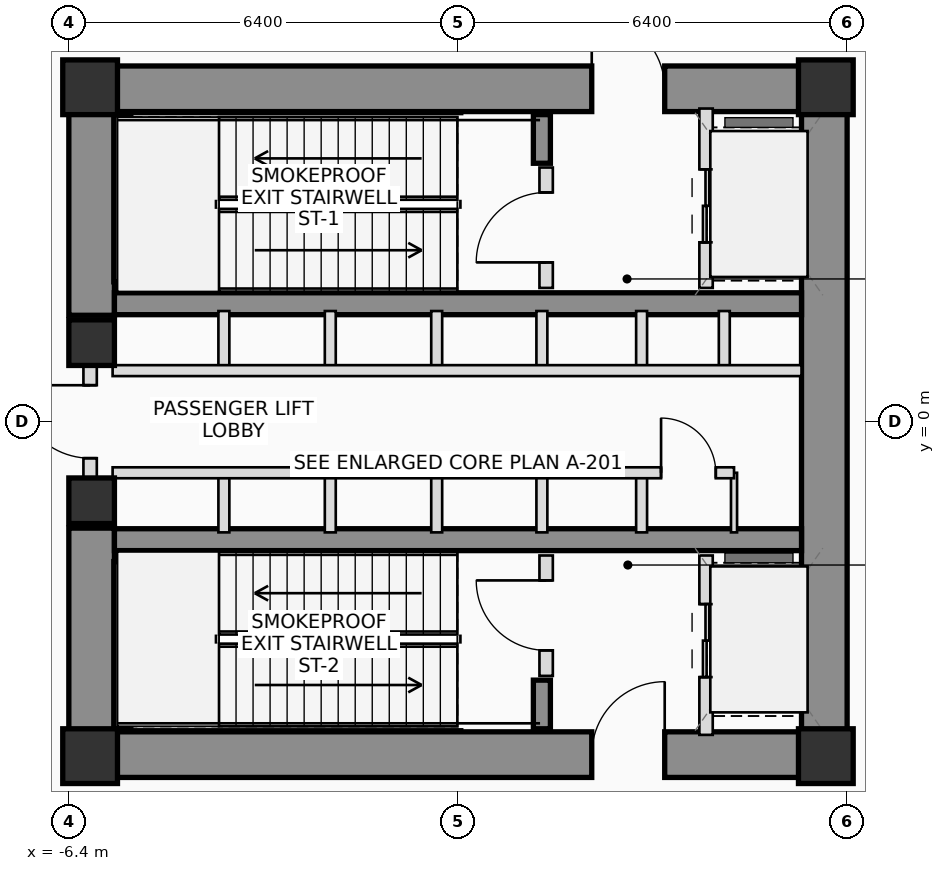
"""IFC4 building model, lengths in metres.
Left out: names, types, materials, properties, quantities, classifications, styles, units other than length and angle.
Written with IfcOpenShell. Run it as: python <this file> out.ifc"""

import sys

from ifc_helpers import new_model, si_unit, direction, frame, frame_2d, origin, origin_2d, place, context, subcontext, project, spatial, rectangle, extrude, source, transform, mapped, element, fill, save


model = new_model("IFC4")
c1 = context("Model", 3, precision=1e-05, world=origin(), true_north=direction((0.0, 1.0)))
c2 = subcontext(c1, "Body", "Model", "MODEL_VIEW")
j1 = project(units=[si_unit("LENGTHUNIT", "METRE"), si_unit("PLANEANGLEUNIT", "RADIAN")], contexts=[c1])
p1 = place(None, origin())
s1 = spatial("IfcSite", under=j1, at=p1, CompositionType="ELEMENT")
p2 = place(p1, origin())
s2 = spatial("IfcBuilding", under=s1, at=p2, CompositionType="ELEMENT")
p3 = place(p2, frame((0.0, 0.0, -4.8)))
s3 = spatial("IfcBuildingStorey", under=s2, at=p3, CompositionType="ELEMENT", Elevation=-4.8)
m1 = source(origin(), c2, "Body", "SweptSolid", [
    extrude(rectangle(XDim=0.9, YDim=0.9, at=origin_2d()), origin(), (0.0, 0.0, 1.0), 4.8),
])
for number, where, z_axis, x_axis in (
    (1, (-6.05, -5.5, 0.0), (0.0, 0.0, 1.0), (1.0, 0.0, 0.0)),
    (2, (6.05, -5.5, 0.0), (0.0, 0.0, 1.0), (1.0, 0.0, 0.0)),
    (3, (6.05, 5.5, 0.0), (0.0, 0.0, 1.0), (1.0, 0.0, 0.0)),
    (4, (-6.05, 5.5, 0.0), (0.0, 0.0, 1.0), (1.0, 0.0, 0.0)),
):
    element("IfcColumn", number, at=place(p3, frame(where, z_axis=z_axis, x_axis=x_axis)), inside=s3, PredefinedType="COLUMN", context=c2, shape_type="MappedRepresentation", body=[
        mapped(m1, transform((0.0, 0.0, 0.0), scale=1.0)),
    ])
p4 = place(p3, frame((-6.4, 5.475, 0.0), z_axis=(0.0, 0.0, 1.0), x_axis=(1.0, 0.0, 0.0)))
e5 = element("IfcWall", 5, at=p4, inside=s3, PredefinedType="SHEAR", context=c2, shape_type="SweptSolid", body=[
    extrude(rectangle(XDim=12.8, YDim=0.75, at=frame_2d((6.4, 0.0))), origin(), (0.0, 0.0, 1.0), 4.8),
])
p5 = place(p4, frame((8.6, 0.0, 0.0)))
e6 = element("IfcOpeningElement", 6, at=p5, cuts=e5, PredefinedType="OPENING", context=c2, shape_type="SweptSolid", body=[
    extrude(rectangle(XDim=1.2, YDim=2.2, at=frame_2d((0.6, 1.1))), frame((0.0, 0.385, 0.0), z_axis=(0.0, -1.0, 0.0), x_axis=(1.0, 0.0, 0.0)), (0.0, 0.0, 1.0), 0.77),
])
p6 = place(p3, frame((-6.4, -5.475, 0.0), z_axis=(0.0, 0.0, 1.0), x_axis=(1.0, 0.0, 0.0)))
e7 = element("IfcWall", 7, at=p6, inside=s3, PredefinedType="SHEAR", context=c2, shape_type="SweptSolid", body=[
    extrude(rectangle(XDim=12.8, YDim=0.75, at=frame_2d((6.4, 0.0))), origin(), (0.0, 0.0, 1.0), 4.8),
])
p7 = place(p6, frame((8.6, 0.0, 0.0)))
e8 = element("IfcOpeningElement", 8, at=p7, cuts=e7, PredefinedType="OPENING", context=c2, shape_type="SweptSolid", body=[
    extrude(rectangle(XDim=1.2, YDim=2.2, at=frame_2d((0.6, 1.1))), frame((0.0, 0.385, 0.0), z_axis=(0.0, -1.0, 0.0), x_axis=(1.0, 0.0, 0.0)), (0.0, 0.0, 1.0), 0.77),
])
p8 = place(p3, frame((6.025, -5.1, 0.0), z_axis=(0.0, 0.0, 1.0), x_axis=(0.0, 1.0, 0.0)))
e9 = element("IfcWall", 9, at=p8, inside=s3, PredefinedType="SHEAR", context=c2, shape_type="SweptSolid", body=[
    extrude(rectangle(XDim=10.2, YDim=0.75, at=frame_2d((5.1, 0.0))), origin(), (0.0, 0.0, 1.0), 4.8),
])
for number, where, z_axis, x_axis in (
    (10, (-6.025, -5.1, 0.0), (0.0, 0.0, 1.0), (0.0, 1.0, 0.0)),
    (11, (-6.025, 1.75, 0.0), (0.0, 0.0, 1.0), (0.0, 1.0, 0.0)),
):
    element("IfcWall", number, at=place(p3, frame(where, z_axis=z_axis, x_axis=x_axis)), inside=s3, PredefinedType="SHEAR", context=c2, shape_type="SweptSolid", body=[
        extrude(rectangle(XDim=3.35, YDim=0.75, at=frame_2d((1.675, 0.0))), origin(), (0.0, 0.0, 1.0), 4.8),
    ])
for number, where, z_axis, x_axis in (
    (12, (-5.65, 1.94, 0.0), (0.0, 0.0, 1.0), (1.0, 0.0, 0.0)),
    (13, (-5.65, -1.94, 0.0), (0.0, 0.0, 1.0), (1.0, 0.0, 0.0)),
):
    element("IfcWall", number, at=place(p3, frame(where, z_axis=z_axis, x_axis=x_axis)), inside=s3, PredefinedType="SHEAR", context=c2, shape_type="SweptSolid", body=[
        extrude(rectangle(XDim=11.3, YDim=0.36, at=frame_2d((5.65, 0.0))), origin(), (0.0, 0.0, 1.0), 4.8),
    ])
p9 = place(p3, frame((-5.52, 2.3, 0.0), z_axis=(0.0, 0.0, 1.0), x_axis=(0.0, 1.0, 0.0)))
e14 = element("IfcWall", 14, at=p9, inside=s3, PredefinedType="SHEAR", context=c2, shape_type="SweptSolid", body=[
    extrude(rectangle(XDim=2.75, YDim=0.28, at=frame_2d((1.375, 0.0))), origin(), (0.0, 0.0, 1.0), 4.8),
])
p10 = place(p3, frame((1.38, 4.25, 0.0), z_axis=(0.0, 0.0, 1.0), x_axis=(0.0, 1.0, 0.0)))
e15 = element("IfcWall", 15, at=p10, inside=s3, PredefinedType="SHEAR", context=c2, shape_type="SweptSolid", body=[
    extrude(rectangle(XDim=0.8, YDim=0.28, at=frame_2d((0.4, 0.0))), origin(), (0.0, 0.0, 1.0), 4.8),
])
p11 = place(p3, frame((-5.52, -5.05, 0.0), z_axis=(0.0, 0.0, 1.0), x_axis=(0.0, 1.0, 0.0)))
e16 = element("IfcWall", 16, at=p11, inside=s3, PredefinedType="SHEAR", context=c2, shape_type="SweptSolid", body=[
    extrude(rectangle(XDim=2.75, YDim=0.28, at=frame_2d((1.375, 0.0))), origin(), (0.0, 0.0, 1.0), 4.8),
])
p12 = place(p3, frame((1.38, -5.05, 0.0), z_axis=(0.0, 0.0, 1.0), x_axis=(0.0, 1.0, 0.0)))
e17 = element("IfcWall", 17, at=p12, inside=s3, PredefinedType="SHEAR", context=c2, shape_type="SweptSolid", body=[
    extrude(rectangle(XDim=0.8, YDim=0.28, at=frame_2d((0.4, 0.0))), origin(), (0.0, 0.0, 1.0), 4.8),
])
m2 = source(origin(), c2, "Body", "SweptSolid", [
    extrude(rectangle(XDim=0.75, YDim=0.75, at=origin_2d()), origin(), (0.0, 0.0, 1.0), 4.8),
])
for number, where, z_axis, x_axis in (
    (18, (-6.025, -1.3, 0.0), (0.0, 0.0, 1.0), (1.0, 0.0, 0.0)),
    (19, (-6.025, 1.3, 0.0), (0.0, 0.0, 1.0), (1.0, 0.0, 0.0)),
):
    element("IfcColumn", number, at=place(p3, frame(where, z_axis=z_axis, x_axis=x_axis)), inside=s3, PredefinedType="COLUMN", context=c2, shape_type="MappedRepresentation", body=[
        mapped(m2, transform((0.0, 0.0, 0.0), scale=1.0)),
    ])
p13 = place(p3, frame((-6.05, -0.95, 0.0), z_axis=(0.0, 0.0, 1.0), x_axis=(0.0, 1.0, 0.0)))
e20 = element("IfcWall", 20, at=p13, inside=s3, PredefinedType="PLUMBINGWALL", context=c2, shape_type="SweptSolid", body=[
    extrude(rectangle(XDim=1.9, YDim=0.22, at=frame_2d((0.95, 0.0))), origin(), (0.0, 0.0, 1.0), 3.52),
])
p14 = place(p13, frame((0.35, 0.0, 0.0)))
e21 = element("IfcOpeningElement", 21, at=p14, cuts=e20, PredefinedType="OPENING", context=c2, shape_type="SweptSolid", body=[
    extrude(rectangle(XDim=1.2, YDim=2.2, at=frame_2d((0.6, 1.1))), frame((0.0, 0.12, 0.0), z_axis=(0.0, -1.0, 0.0), x_axis=(1.0, 0.0, 0.0)), (0.0, 0.0, 1.0), 0.24),
])
p15 = place(p3, frame((1.45, 2.2, 0.0), z_axis=(0.0, 0.0, 1.0), x_axis=(0.0, 1.0, 0.0)))
e22 = element("IfcWall", 22, at=p15, inside=s3, PredefinedType="PLUMBINGWALL", context=c2, shape_type="SweptSolid", body=[
    extrude(rectangle(XDim=1.98, YDim=0.22, at=frame_2d((0.99, 0.0))), origin(), (0.0, 0.0, 1.0), 4.54),
])
p16 = place(p15, frame((0.42, 0.0, 0.0)))
e23 = element("IfcOpeningElement", 23, at=p16, cuts=e22, PredefinedType="OPENING", context=c2, shape_type="SweptSolid", body=[
    extrude(rectangle(XDim=1.15, YDim=2.15, at=frame_2d((0.575, 1.075))), frame((0.0, 0.12, 0.0), z_axis=(0.0, -1.0, 0.0), x_axis=(1.0, 0.0, 0.0)), (0.0, 0.0, 1.0), 0.24),
])
p17 = place(p3, frame((4.08, 2.2, 0.0), z_axis=(0.0, 0.0, 1.0), x_axis=(0.0, 1.0, 0.0)))
e24 = element("IfcWall", 24, at=p17, inside=s3, PredefinedType="PLUMBINGWALL", context=c2, shape_type="SweptSolid", body=[
    extrude(rectangle(XDim=2.95, YDim=0.22, at=frame_2d((1.475, 0.0))), origin(), (0.0, 0.0, 1.0), 4.54),
])
p18 = place(p17, frame((0.75, 0.0, 0.0)))
e25 = element("IfcOpeningElement", 25, at=p18, cuts=e24, PredefinedType="OPENING", context=c2, shape_type="SweptSolid", body=[
    extrude(rectangle(XDim=1.2, YDim=2.25, at=frame_2d((0.6, 1.125))), frame((0.0, 0.12, 0.0), z_axis=(0.0, -1.0, 0.0), x_axis=(1.0, 0.0, 0.0)), (0.0, 0.0, 1.0), 0.24),
])
p19 = place(p3, frame((1.45, -4.18, 0.0), z_axis=(0.0, 0.0, 1.0), x_axis=(0.0, 1.0, 0.0)))
e26 = element("IfcWall", 26, at=p19, inside=s3, PredefinedType="PLUMBINGWALL", context=c2, shape_type="SweptSolid", body=[
    extrude(rectangle(XDim=1.98, YDim=0.22, at=frame_2d((0.99, 0.0))), origin(), (0.0, 0.0, 1.0), 4.54),
])
p20 = place(p19, frame((0.42, 0.0, 0.0)))
e27 = element("IfcOpeningElement", 27, at=p20, cuts=e26, PredefinedType="OPENING", context=c2, shape_type="SweptSolid", body=[
    extrude(rectangle(XDim=1.15, YDim=2.15, at=frame_2d((0.575, 1.075))), frame((0.0, 0.12, 0.0), z_axis=(0.0, -1.0, 0.0), x_axis=(1.0, 0.0, 0.0)), (0.0, 0.0, 1.0), 0.24),
])
p21 = place(p3, frame((4.08, -5.15, 0.0), z_axis=(0.0, 0.0, 1.0), x_axis=(0.0, 1.0, 0.0)))
e28 = element("IfcWall", 28, at=p21, inside=s3, PredefinedType="PLUMBINGWALL", context=c2, shape_type="SweptSolid", body=[
    extrude(rectangle(XDim=2.95, YDim=0.22, at=frame_2d((1.475, 0.0))), origin(), (0.0, 0.0, 1.0), 4.54),
])
p22 = place(p21, frame((0.95, 0.0, 0.0)))
e29 = element("IfcOpeningElement", 29, at=p22, cuts=e28, PredefinedType="OPENING", context=c2, shape_type="SweptSolid", body=[
    extrude(rectangle(XDim=1.2, YDim=2.25, at=frame_2d((0.6, 1.125))), frame((0.0, 0.12, 0.0), z_axis=(0.0, -1.0, 0.0), x_axis=(1.0, 0.0, 0.0)), (0.0, 0.0, 1.0), 0.24),
])
for number, where, z_axis, x_axis in (
    (30, (-3.85, 0.84, 0.0), (0.0, 0.0, 1.0), (0.0, 1.0, 0.0)),
    (31, (-3.85, -1.82, 0.0), (0.0, 0.0, 1.0), (0.0, 1.0, 0.0)),
    (32, (-2.1, 0.84, 0.0), (0.0, 0.0, 1.0), (0.0, 1.0, 0.0)),
    (33, (-2.1, -1.82, 0.0), (0.0, 0.0, 1.0), (0.0, 1.0, 0.0)),
    (34, (-0.35, 0.84, 0.0), (0.0, 0.0, 1.0), (0.0, 1.0, 0.0)),
    (35, (-0.35, -1.82, 0.0), (0.0, 0.0, 1.0), (0.0, 1.0, 0.0)),
    (36, (1.38, 0.84, 0.0), (0.0, 0.0, 1.0), (0.0, 1.0, 0.0)),
    (37, (1.38, -1.82, 0.0), (0.0, 0.0, 1.0), (0.0, 1.0, 0.0)),
    (38, (3.02, 0.84, 0.0), (0.0, 0.0, 1.0), (0.0, 1.0, 0.0)),
    (39, (4.38, 0.84, 0.0), (0.0, 0.0, 1.0), (0.0, 1.0, 0.0)),
    (40, (3.02, -1.82, 0.0), (0.0, 0.0, 1.0), (0.0, 1.0, 0.0)),
):
    element("IfcWall", number, at=place(p3, frame(where, z_axis=z_axis, x_axis=x_axis)), inside=s3, PredefinedType="PLUMBINGWALL", context=c2, shape_type="SweptSolid", body=[
        extrude(rectangle(XDim=0.98, YDim=0.18, at=frame_2d((0.49, 0.0))), origin(), (0.0, 0.0, 1.0), 4.54),
    ])
p23 = place(p3, frame((4.54, -1.82, 0.0), z_axis=(0.0, 0.0, 1.0), x_axis=(0.0, 1.0, 0.0)))
e41 = element("IfcWall", 41, at=p23, inside=s3, PredefinedType="PARTITIONING", context=c2, shape_type="SweptSolid", body=[
    extrude(rectangle(XDim=0.98, YDim=0.1, at=frame_2d((0.49, 0.0))), origin(), (0.0, 0.0, 1.0), 4.54),
])
p24 = place(p3, frame((-5.68, 0.84, 0.0), z_axis=(0.0, 0.0, 1.0), x_axis=(1.0, 0.0, 0.0)))
e42 = element("IfcWall", 42, at=p24, inside=s3, PredefinedType="PLUMBINGWALL", context=c2, shape_type="SweptSolid", body=[
    extrude(rectangle(XDim=11.33, YDim=0.18, at=frame_2d((5.665, 0.0))), origin(), (0.0, 0.0, 1.0), 4.54),
])
p25 = place(p3, frame((-5.68, -0.84, 0.0), z_axis=(0.0, 0.0, 1.0), x_axis=(1.0, 0.0, 0.0)))
e43 = element("IfcWall", 43, at=p25, inside=s3, PredefinedType="PLUMBINGWALL", context=c2, shape_type="SweptSolid", body=[
    extrude(rectangle(XDim=10.22, YDim=0.18, at=frame_2d((5.11, 0.0))), origin(), (0.0, 0.0, 1.0), 4.54),
])
p26 = place(p25, frame((9.02, 0.0, 0.0)))
e44 = element("IfcOpeningElement", 44, at=p26, cuts=e43, PredefinedType="OPENING", context=c2, shape_type="SweptSolid", body=[
    extrude(rectangle(XDim=0.9, YDim=2.05, at=frame_2d((0.45, 1.025))), frame((0.0, 0.1, 0.0), z_axis=(0.0, -1.0, 0.0), x_axis=(1.0, 0.0, 0.0)), (0.0, 0.0, 1.0), 0.2),
])
p27 = place(p5, origin())
e45 = element("IfcDoor", 45, at=p27, inside=s3, OperationType="SINGLE_SWING_LEFT", PredefinedType="DOOR", context=c2, shape_type="SweptSolid", body=[
    extrude(rectangle(XDim=1.2, YDim=2.2, at=frame_2d((0.6, 1.1))), frame((0.0, 0.025, 0.0), z_axis=(0.0, -1.0, 0.0), x_axis=(1.0, 0.0, 0.0)), (0.0, 0.0, 1.0), 0.05),
])
fill(e6, e45)
p28 = place(p7, origin())
e46 = element("IfcDoor", 46, at=p28, inside=s3, OperationType="SINGLE_SWING_RIGHT", PredefinedType="DOOR", context=c2, shape_type="SweptSolid", body=[
    extrude(rectangle(XDim=1.2, YDim=2.2, at=frame_2d((0.6, 1.1))), frame((0.0, 0.025, 0.0), z_axis=(0.0, -1.0, 0.0), x_axis=(1.0, 0.0, 0.0)), (0.0, 0.0, 1.0), 0.05),
])
fill(e8, e46)
p29 = place(p14, origin())
e47 = element("IfcDoor", 47, at=p29, inside=s3, OperationType="SINGLE_SWING_RIGHT", PredefinedType="DOOR", context=c2, shape_type="SweptSolid", body=[
    extrude(rectangle(XDim=1.2, YDim=2.2, at=frame_2d((0.6, 1.1))), frame((0.0, 0.025, 0.0), z_axis=(0.0, -1.0, 0.0), x_axis=(1.0, 0.0, 0.0)), (0.0, 0.0, 1.0), 0.05),
])
fill(e21, e47)
p30 = place(p16, origin())
e48 = element("IfcDoor", 48, at=p30, inside=s3, OperationType="SINGLE_SWING_LEFT", PredefinedType="DOOR", context=c2, shape_type="SweptSolid", body=[
    extrude(rectangle(XDim=1.15, YDim=2.15, at=frame_2d((0.575, 1.075))), frame((0.0, 0.025, 0.0), z_axis=(0.0, -1.0, 0.0), x_axis=(1.0, 0.0, 0.0)), (0.0, 0.0, 1.0), 0.05),
])
fill(e23, e48)
p31 = place(p18, origin())
e49 = element("IfcDoor", 49, at=p31, inside=s3, OperationType="DOUBLE_DOOR_SLIDING", PredefinedType="DOOR", context=c2, shape_type="SweptSolid", body=[
    extrude(rectangle(XDim=1.2, YDim=2.25, at=frame_2d((0.6, 1.125))), frame((0.0, 0.025, 0.0), z_axis=(0.0, -1.0, 0.0), x_axis=(1.0, 0.0, 0.0)), (0.0, 0.0, 1.0), 0.05),
])
fill(e25, e49)
p32 = place(p20, origin())
e50 = element("IfcDoor", 50, at=p32, inside=s3, OperationType="SINGLE_SWING_RIGHT", PredefinedType="DOOR", context=c2, shape_type="SweptSolid", body=[
    extrude(rectangle(XDim=1.15, YDim=2.15, at=frame_2d((0.575, 1.075))), frame((0.0, 0.025, 0.0), z_axis=(0.0, -1.0, 0.0), x_axis=(1.0, 0.0, 0.0)), (0.0, 0.0, 1.0), 0.05),
])
fill(e27, e50)
p33 = place(p22, origin())
e51 = element("IfcDoor", 51, at=p33, inside=s3, OperationType="DOUBLE_DOOR_SLIDING", PredefinedType="DOOR", context=c2, shape_type="SweptSolid", body=[
    extrude(rectangle(XDim=1.2, YDim=2.25, at=frame_2d((0.6, 1.125))), frame((0.0, 0.025, 0.0), z_axis=(0.0, -1.0, 0.0), x_axis=(1.0, 0.0, 0.0)), (0.0, 0.0, 1.0), 0.05),
])
fill(e29, e51)
p34 = place(p26, origin())
e52 = element("IfcDoor", 52, at=p34, inside=s3, OperationType="SINGLE_SWING_LEFT", PredefinedType="DOOR", context=c2, shape_type="SweptSolid", body=[
    extrude(rectangle(XDim=0.9, YDim=2.05, at=frame_2d((0.45, 1.025))), frame((0.0, 0.025, 0.0), z_axis=(0.0, -1.0, 0.0), x_axis=(1.0, 0.0, 0.0)), (0.0, 0.0, 1.0), 0.05),
])
fill(e44, e52)
save(model, sys.argv[1])
